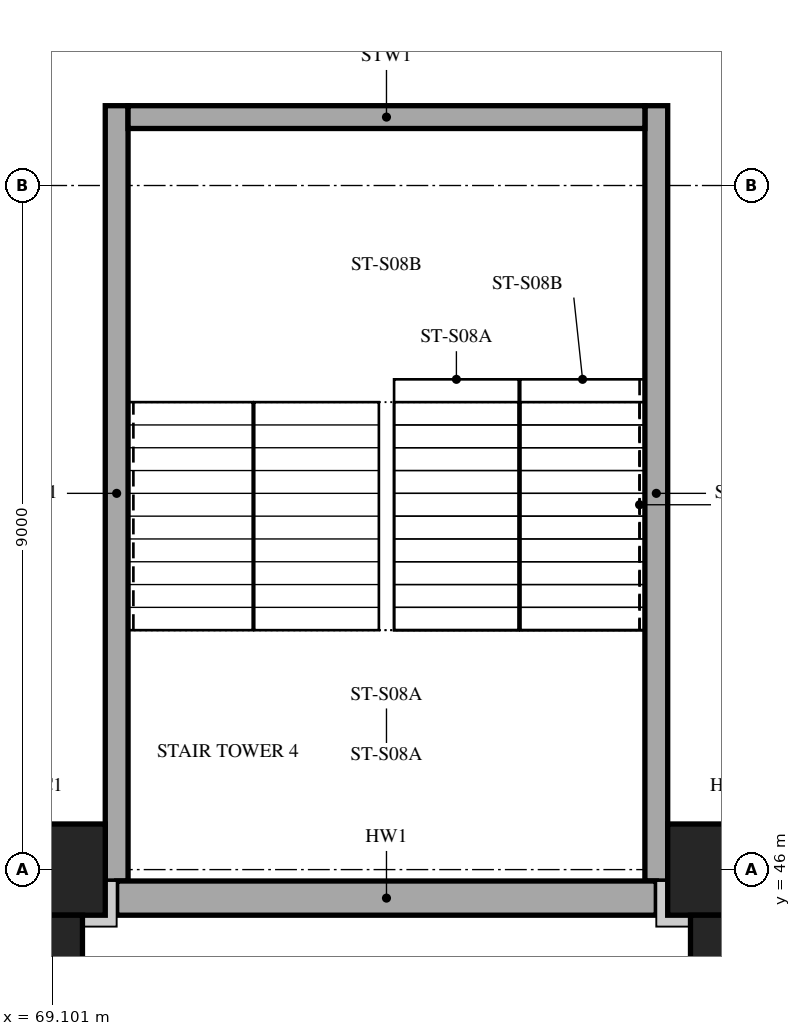
"""IFC4 building model, lengths in metres.
Left out: names, types, materials, properties, quantities, classifications, styles, units other than length and angle.
Written with IfcOpenShell. Run it as: python <this file> out.ifc"""

import sys

from ifc_helpers import new_model, si_unit, direction, frame, frame_2d, origin, origin_2d, place, context, subcontext, project, spatial, rectangle, extrude, element, save


model = new_model("IFC4")
c1 = context("Model", 3, precision=1e-05, world=origin(), true_north=direction((0.0, 1.0)))
c2 = subcontext(c1, "Body", "Model", "MODEL_VIEW")
j1 = project(units=[si_unit("LENGTHUNIT", "METRE"), si_unit("PLANEANGLEUNIT", "RADIAN")], contexts=[c1])
p1 = place(None, origin())
s1 = spatial("IfcSite", under=j1, at=p1, CompositionType="ELEMENT")
p2 = place(p1, origin())
s2 = spatial("IfcBuilding", under=s1, at=p2, CompositionType="ELEMENT")
p3 = place(p2, frame((0.0, 0.0, 5.0)))
s3 = spatial("IfcBuildingStorey", under=s2, at=p3, CompositionType="ELEMENT", Elevation=5.0)
for number, where, z_axis, x_axis in (
    (1, (69.0, 46.0, 0.0), (0.0, 0.0, 1.0), (1.0, 0.0, 0.0)),
    (2, (78.0, 46.0, 0.0), (0.0, 0.0, 1.0), (1.0, 0.0, 0.0)),
):
    element("IfcColumn", number, at=place(p3, frame(where, z_axis=z_axis, x_axis=x_axis)), inside=s3, PredefinedType="COLUMN", context=c2, shape_type="SweptSolid", body=[
        extrude(rectangle(XDim=1.6, YDim=1.2, at=origin_2d()), origin(), (0.0, 0.0, 1.0), 5.0),
    ])
for number, where, z_axis, x_axis in (
    (3, (69.95, 45.85, 0.0), (0.0, 0.0, 1.0), (0.0, 1.0, 0.0)),
    (4, (77.05, 45.85, 0.0), (0.0, 0.0, 1.0), (0.0, 1.0, 0.0)),
):
    element("IfcWall", number, at=place(p3, frame(where, z_axis=z_axis, x_axis=x_axis)), inside=s3, PredefinedType="SHEAR", context=c2, shape_type="SweptSolid", body=[
        extrude(rectangle(XDim=10.2, YDim=0.3, at=frame_2d((5.1, 0.0))), origin(), (0.0, 0.0, 1.0), 5.0),
    ])
p4 = place(p3, frame((70.1, 55.9, 0.0), z_axis=(0.0, 0.0, 1.0), x_axis=(1.0, 0.0, 0.0)))
e5 = element("IfcWall", 5, at=p4, inside=s3, PredefinedType="SHEAR", context=c2, shape_type="SweptSolid", body=[
    extrude(rectangle(XDim=6.8, YDim=0.3, at=frame_2d((3.4, 0.0))), origin(), (0.0, 0.0, 1.0), 5.0),
])
for number, where, z_axis, x_axis in (
    (6, (69.0, 44.9, 0.0), (0.0, 0.0, 1.0), (1.0, 0.0, 0.0)),
    (7, (78.0, 44.9, 0.0), (0.0, 0.0, 1.0), (1.0, 0.0, 0.0)),
):
    element("IfcColumn", number, at=place(p3, frame(where, z_axis=z_axis, x_axis=x_axis)), inside=s3, PredefinedType="COLUMN", context=c2, shape_type="SweptSolid", body=[
        extrude(rectangle(XDim=1.0, YDim=1.0, at=origin_2d()), origin(), (0.0, 0.0, 1.0), 5.0),
    ])
p5 = place(p3, frame((69.95, 45.625, 0.0), z_axis=(0.0, 0.0, 1.0), x_axis=(1.0, 0.0, 0.0)))
e8 = element("IfcWall", 8, at=p5, inside=s3, PredefinedType="SOLIDWALL", context=c2, shape_type="SweptSolid", body=[
    extrude(rectangle(XDim=7.1, YDim=0.45, at=frame_2d((3.55, 0.0))), origin(), (0.0, 0.0, 1.0), 5.0),
])
save(model, sys.argv[1])
